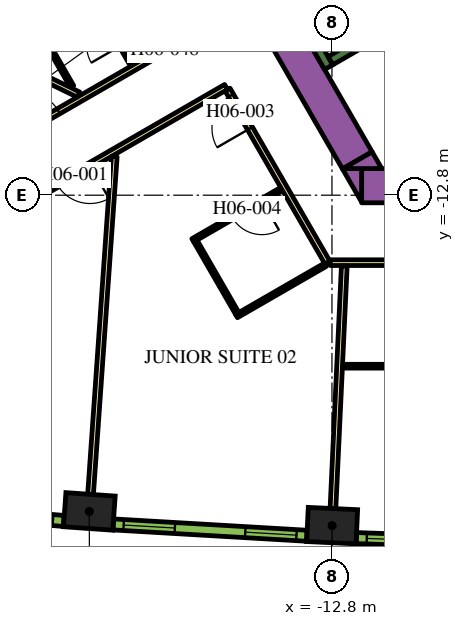
"""IFC4 building model, lengths in metres.
Left out: names, types, materials, properties, quantities, classifications, styles, units other than length and angle.
Written with IfcOpenShell. Run it as: python <this file> out.ifc"""

import sys

from ifc_helpers import new_model, si_unit, direction, frame, frame_2d, origin, origin_2d, place, context, subcontext, project, spatial, polyline, rectangle, outline, extrude, element, fill, save


model = new_model("IFC4")
c1 = context("Model", 3, precision=1e-05, world=origin(), true_north=direction((0.0, 1.0)))
c2 = subcontext(c1, "Body", "Model", "MODEL_VIEW")
j1 = project(units=[si_unit("LENGTHUNIT", "METRE"), si_unit("PLANEANGLEUNIT", "RADIAN")], contexts=[c1])
p1 = place(None, origin())
s1 = spatial("IfcSite", under=j1, at=p1, CompositionType="ELEMENT")
p2 = place(p1, origin())
s2 = spatial("IfcBuilding", under=s1, at=p2, CompositionType="ELEMENT")
p3 = place(p2, frame((0.0, 0.0, 83.7)))
s3 = spatial("IfcBuildingStorey", under=s2, at=p3, CompositionType="ELEMENT", Elevation=83.7)
for number, where, z_axis, x_axis in (
    (1, (-19.184, -21.12, 0.0), (0.0, 0.0, 1.0), (0.998, -0.07, 0.0)),
    (2, (-12.795, -21.494, 0.0), (0.0, 0.0, 1.0), (0.999, -0.047, 0.0)),
):
    element("IfcColumn", number, at=place(p3, frame(where, z_axis=z_axis, x_axis=x_axis)), inside=s3, PredefinedType="COLUMN", context=c2, shape_type="SweptSolid", body=[
        extrude(rectangle(XDim=1.3, YDim=0.9, at=origin_2d()), origin(), (0.0, 0.0, 1.0), 3.9),
    ])
p4 = place(p3, frame((-12.019, -12.55, 0.0), z_axis=(0.0, 0.0, 1.0), x_axis=(1.0, 0.0, 0.0)))
e3 = element("IfcWall", 3, at=p4, inside=s3, PredefinedType="SOLIDWALL", context=c2, shape_type="SweptSolid", body=[
    extrude(rectangle(XDim=21.63, YDim=0.9, at=frame_2d((10.815, 0.0))), origin(), (0.0, 0.0, 1.0), 3.9),
])
p5 = place(p3, origin())
e4 = element("IfcWall", 4, at=p5, inside=s3, PredefinedType="SOLIDWALL", context=c2, shape_type="SweptSolid", body=[
    extrude(outline(polyline([(-12.529, -12.1), (-12.021, -12.1), (-12.021, -12.98), (-12.529, -12.1)])), origin(), (0.0, 0.0, 1.0), 3.9),
])
p6 = place(p3, frame((-12.134, -11.883, 0.0), z_axis=(0.0, 0.0, 1.0), x_axis=(-0.500005339912, 0.866022320763, 0.0)))
e5 = element("IfcWall", 5, at=p6, inside=s3, PredefinedType="SOLIDWALL", context=c2, shape_type="SweptSolid", body=[
    extrude(rectangle(XDim=9.488, YDim=0.9, at=frame_2d((4.744, 0.0))), origin(), (0.0, 0.0, 1.0), 3.9),
])
e6 = element("IfcWall", 6, at=p5, inside=s3, PredefinedType="SOLIDWALL", context=c2, shape_type="SweptSolid", body=[
    extrude(outline(polyline([(-11.489, -12.1), (-12.505, -12.1), (-11.743, -11.66), (-11.489, -12.1)])), origin(), (0.0, 0.0, 1.0), 3.9),
])
p7 = place(p3, frame((-12.885, -9.431, 0.0), z_axis=(0.0, 0.0, 1.0), x_axis=(-0.500020560727, 0.866013532718, 0.0)))
e7 = element("IfcWall", 7, at=p7, inside=s3, PredefinedType="SOLIDWALL", context=c2, shape_type="SweptSolid", body=[
    extrude(rectangle(XDim=3.45, YDim=0.25, at=frame_2d((1.725, 0.0))), origin(), (0.0, 0.0, 1.0), 3.9),
])
p8 = place(p3, frame((-12.84, -9.261, 0.0), z_axis=(0.0, 0.0, 1.0), x_axis=(0.866016039709, 0.500016218704, 0.0)))
e8 = element("IfcWall", 8, at=p8, inside=s3, PredefinedType="SOLIDWALL", context=c2, shape_type="SweptSolid", body=[
    extrude(rectangle(XDim=7.05, YDim=0.25, at=frame_2d((3.525, 0.0))), origin(), (0.0, 0.0, 1.0), 3.9),
])
p9 = place(p3, frame((-28.211, -15.335, 0.0), z_axis=(0.0, 0.0, 1.0), x_axis=(0.866025884867, 0.49999916674, 0.0)))
e9 = element("IfcWall", 9, at=p9, inside=s3, PredefinedType="PARTITIONING", context=c2, shape_type="SweptSolid", body=[
    extrude(rectangle(XDim=13.543, YDim=0.15, at=frame_2d((6.772, 0.0))), origin(), (0.0, 0.0, 1.0), 2.75),
])
p10 = place(p9, frame((12.214, 0.0, 0.0)))
e10 = element("IfcOpeningElement", 10, at=p10, cuts=e9, PredefinedType="OPENING", context=c2, shape_type="SweptSolid", body=[
    extrude(rectangle(XDim=1.0, YDim=2.1, at=frame_2d((0.5, 1.05))), frame((0.0, 0.085, 0.0), z_axis=(0.0, -1.0, 0.0), x_axis=(1.0, 0.0, 0.0)), (0.0, 0.0, 1.0), 0.17),
])
p11 = place(p9, frame((8.488, 0.0, 0.0)))
e11 = element("IfcOpeningElement", 11, at=p11, cuts=e9, PredefinedType="OPENING", context=c2, shape_type="SweptSolid", body=[
    extrude(rectangle(XDim=1.0, YDim=2.1, at=frame_2d((0.5, 1.05))), frame((0.0, 0.085, 0.0), z_axis=(0.0, -1.0, 0.0), x_axis=(1.0, 0.0, 0.0)), (0.0, 0.0, 1.0), 0.17),
])
p12 = place(p3, frame((-15.587, -9.952, 0.0), z_axis=(0.0, 0.0, 1.0), x_axis=(-0.866017869832, -0.500013048961, 0.0)))
e12 = element("IfcWall", 12, at=p12, inside=s3, PredefinedType="PARTITIONING", context=c2, shape_type="SweptSolid", body=[
    extrude(rectangle(XDim=13.624, YDim=0.15, at=frame_2d((6.812, 0.0))), origin(), (0.0, 0.0, 1.0), 2.75),
])
p13 = place(p12, frame((4.134, 0.0, 0.0)))
e13 = element("IfcOpeningElement", 13, at=p13, cuts=e12, PredefinedType="OPENING", context=c2, shape_type="SweptSolid", body=[
    extrude(rectangle(XDim=1.0, YDim=2.1, at=frame_2d((0.5, 1.05))), frame((0.0, 0.085, 0.0), z_axis=(0.0, -1.0, 0.0), x_axis=(1.0, 0.0, 0.0)), (0.0, 0.0, 1.0), 0.17),
])
p14 = place(p3, frame((-12.918, -14.575, 0.0), z_axis=(0.0, 0.0, 1.0), x_axis=(-0.500009150678, 0.866020120573, 0.0)))
e14 = element("IfcWall", 14, at=p14, inside=s3, PredefinedType="PARTITIONING", context=c2, shape_type="SweptSolid", body=[
    extrude(rectangle(XDim=5.258, YDim=0.15, at=frame_2d((2.629, 0.0))), origin(), (0.0, 0.0, 1.0), 2.75),
])
p15 = place(p14, frame((4.078, 0.0, 0.0)))
e15 = element("IfcOpeningElement", 15, at=p15, cuts=e14, PredefinedType="OPENING", context=c2, shape_type="SweptSolid", body=[
    extrude(rectangle(XDim=1.0, YDim=2.1, at=frame_2d((0.5, 1.05))), frame((0.0, 0.085, 0.0), z_axis=(0.0, -1.0, 0.0), x_axis=(1.0, 0.0, 0.0)), (0.0, 0.0, 1.0), 0.17),
])
p16 = place(p3, frame((12.918, -14.575, 0.0), z_axis=(0.0, 0.0, 1.0), x_axis=(-1.0, 0.0, 0.0)))
e16 = element("IfcWall", 16, at=p16, inside=s3, PredefinedType="PARTITIONING", context=c2, shape_type="SweptSolid", body=[
    extrude(rectangle(XDim=25.766, YDim=0.15, at=frame_2d((12.883, 0.0))), origin(), (0.0, 0.0, 1.0), 2.75),
])
p17 = place(p16, frame((19.306, 0.0, 0.0)))
e17 = element("IfcOpeningElement", 17, at=p17, cuts=e16, PredefinedType="OPENING", context=c2, shape_type="SweptSolid", body=[
    extrude(rectangle(XDim=1.0, YDim=2.1, at=frame_2d((0.5, 1.05))), frame((0.0, 0.085, 0.0), z_axis=(0.0, -1.0, 0.0), x_axis=(1.0, 0.0, 0.0)), (0.0, 0.0, 1.0), 0.17),
])
p18 = place(p16, frame((17.999, 0.0, 0.0)))
e18 = element("IfcOpeningElement", 18, at=p18, cuts=e16, PredefinedType="OPENING", context=c2, shape_type="SweptSolid", body=[
    extrude(rectangle(XDim=1.0, YDim=2.1, at=frame_2d((0.5, 1.05))), frame((0.0, 0.085, 0.0), z_axis=(0.0, -1.0, 0.0), x_axis=(1.0, 0.0, 0.0)), (0.0, 0.0, 1.0), 0.17),
])
p19 = place(p16, frame((10.874, 0.0, 0.0)))
e19 = element("IfcOpeningElement", 19, at=p19, cuts=e16, PredefinedType="OPENING", context=c2, shape_type="SweptSolid", body=[
    extrude(rectangle(XDim=0.9, YDim=2.1, at=frame_2d((0.45, 1.05))), frame((0.0, 0.085, 0.0), z_axis=(0.0, -1.0, 0.0), x_axis=(1.0, 0.0, 0.0)), (0.0, 0.0, 1.0), 0.17),
])
p20 = place(p16, frame((8.647, 0.0, 0.0)))
e20 = element("IfcOpeningElement", 20, at=p20, cuts=e16, PredefinedType="OPENING", context=c2, shape_type="SweptSolid", body=[
    extrude(rectangle(XDim=1.0, YDim=2.1, at=frame_2d((0.5, 1.05))), frame((0.0, 0.085, 0.0), z_axis=(0.0, -1.0, 0.0), x_axis=(1.0, 0.0, 0.0)), (0.0, 0.0, 1.0), 0.17),
])
p21 = place(p16, frame((0.18, 0.0, 0.0)))
e21 = element("IfcOpeningElement", 21, at=p21, cuts=e16, PredefinedType="OPENING", context=c2, shape_type="SweptSolid", body=[
    extrude(rectangle(XDim=1.0, YDim=2.1, at=frame_2d((0.5, 1.05))), frame((0.0, 0.085, 0.0), z_axis=(0.0, -1.0, 0.0), x_axis=(1.0, 0.0, 0.0)), (0.0, 0.0, 1.0), 0.17),
])
p22 = place(p3, frame((-27.479, -6.251, 0.0), z_axis=(0.0, 0.0, 1.0), x_axis=(0.898945877276, -0.438059710231, 0.0)))
e22 = element("IfcWall", 22, at=p22, inside=s3, PredefinedType="PARTITIONING", context=c2, shape_type="SweptSolid", body=[
    extrude(rectangle(XDim=8.909, YDim=0.15, at=frame_2d((4.455, 0.0))), origin(), (0.0, 0.0, 1.0), 2.75),
])
p23 = place(p3, frame((-19.153, -20.671, 0.0), z_axis=(0.0, 0.0, 1.0), x_axis=(0.070070736723, 0.997542025107, 0.0)))
e23 = element("IfcWall", 23, at=p23, inside=s3, PredefinedType="PARTITIONING", context=c2, shape_type="SweptSolid", body=[
    extrude(rectangle(XDim=8.909, YDim=0.15, at=frame_2d((4.455, 0.0))), origin(), (0.0, 0.0, 1.0), 2.75),
])
p24 = place(p3, frame((-12.774, -21.045, 0.0), z_axis=(0.0, 0.0, 1.0), x_axis=(0.046750341626, 0.998906605023, 0.0)))
e24 = element("IfcWall", 24, at=p24, inside=s3, PredefinedType="PARTITIONING", context=c2, shape_type="SweptSolid", body=[
    extrude(rectangle(XDim=6.392, YDim=0.15, at=frame_2d((3.196, 0.0))), origin(), (0.0, 0.0, 1.0), 2.75),
])
p25 = place(p3, frame((-14.123, -12.638, 0.0), z_axis=(0.0, 0.0, 1.0), x_axis=(-0.86599734893, -0.500048589285, 0.0)))
e25 = element("IfcWall", 25, at=p25, inside=s3, PredefinedType="PARTITIONING", context=c2, shape_type="SweptSolid", body=[
    extrude(rectangle(XDim=2.7, YDim=0.1, at=frame_2d((1.35, 0.0))), origin(), (0.0, 0.0, 1.0), 2.75),
])
p26 = place(p25, frame((0.6, 0.0, 0.0)))
e26 = element("IfcOpeningElement", 26, at=p26, cuts=e25, PredefinedType="OPENING", context=c2, shape_type="SweptSolid", body=[
    extrude(rectangle(XDim=0.9, YDim=2.1, at=frame_2d((0.45, 1.05))), frame((0.0, 0.06, 0.0), z_axis=(0.0, -1.0, 0.0), x_axis=(1.0, 0.0, 0.0)), (0.0, 0.0, 1.0), 0.12),
])
p27 = place(p3, frame((-16.393, -14.006, 0.0), z_axis=(0.0, 0.0, 1.0), x_axis=(0.499946605688, -0.86605622881, 0.0)))
e27 = element("IfcWall", 27, at=p27, inside=s3, PredefinedType="PARTITIONING", context=c2, shape_type="SweptSolid", body=[
    extrude(rectangle(XDim=2.2, YDim=0.1, at=frame_2d((1.1, 0.0))), origin(), (0.0, 0.0, 1.0), 2.75),
])
p28 = place(p3, frame((-12.973, -14.63, 0.0), z_axis=(0.0, 0.0, 1.0), x_axis=(-0.866036505625, -0.499980770555, 0.0)))
e28 = element("IfcWall", 28, at=p28, inside=s3, PredefinedType="PARTITIONING", context=c2, shape_type="SweptSolid", body=[
    extrude(rectangle(XDim=2.7, YDim=0.1, at=frame_2d((1.35, 0.0))), origin(), (0.0, 0.0, 1.0), 2.75),
])
p29 = place(p3, frame((-10.272, -17.3, 0.0), z_axis=(0.0, 0.0, 1.0), x_axis=(-1.0, 0.0, 0.0)))
e29 = element("IfcWall", 29, at=p29, inside=s3, PredefinedType="PARTITIONING", context=c2, shape_type="SweptSolid", body=[
    extrude(rectangle(XDim=2.25, YDim=0.1, at=frame_2d((1.125, 0.0))), origin(), (0.0, 0.0, 1.0), 2.75),
])
p30 = place(p3, frame((-18.055, -9.385, 0.0), z_axis=(0.0, 0.0, 1.0), x_axis=(-0.499939757307, 0.866060182126, 0.0)))
e30 = element("IfcWall", 30, at=p30, inside=s3, PredefinedType="PARTITIONING", context=c2, shape_type="SweptSolid", body=[
    extrude(rectangle(XDim=2.95, YDim=0.1, at=frame_2d((1.475, 0.0))), origin(), (0.0, 0.0, 1.0), 2.75),
])
p31 = place(p30, frame((0.6, 0.0, 0.0)))
e31 = element("IfcOpeningElement", 31, at=p31, cuts=e30, PredefinedType="OPENING", context=c2, shape_type="SweptSolid", body=[
    extrude(rectangle(XDim=0.9, YDim=2.1, at=frame_2d((0.45, 1.05))), frame((0.0, 0.06, 0.0), z_axis=(0.0, -1.0, 0.0), x_axis=(1.0, 0.0, 0.0)), (0.0, 0.0, 1.0), 0.12),
])
p32 = place(p3, frame((-19.639, -9.941, 0.0), z_axis=(0.0, 0.0, 1.0), x_axis=(-0.499938597367, 0.866060851709, 0.0)))
e32 = element("IfcWall", 32, at=p32, inside=s3, PredefinedType="PARTITIONING", context=c2, shape_type="SweptSolid", body=[
    extrude(rectangle(XDim=2.64, YDim=0.1, at=frame_2d((1.32, 0.0))), origin(), (0.0, 0.0, 1.0), 2.75),
])
p33 = place(p3, frame((-24.946, -20.954, 0.0), z_axis=(0.0, 0.0, 1.0), x_axis=(0.99665273362, -0.081751627308, 0.0)))
e33 = element("IfcWall", 33, at=p33, inside=s3, PredefinedType="SOLIDWALL", context=c2, shape_type="SweptSolid", body=[
    extrude(rectangle(XDim=5.107, YDim=0.29, at=frame_2d((2.553, 0.0))), origin(), (0.0, 0.0, 1.0), 3.65),
])
p34 = place(p33, frame((0.24, 0.0, 0.9)))
e34 = element("IfcOpeningElement", 34, at=p34, cuts=e33, PredefinedType="OPENING", context=c2, shape_type="SweptSolid", body=[
    extrude(rectangle(XDim=1.35, YDim=2.15, at=frame_2d((0.675, 1.075))), frame((0.0, 0.155, 0.0), z_axis=(0.0, -1.0, 0.0), x_axis=(1.0, 0.0, 0.0)), (0.0, 0.0, 1.0), 0.31),
])
p35 = place(p33, frame((3.471, 0.0, 0.9)))
e35 = element("IfcOpeningElement", 35, at=p35, cuts=e33, PredefinedType="OPENING", context=c2, shape_type="SweptSolid", body=[
    extrude(rectangle(XDim=1.35, YDim=2.15, at=frame_2d((0.675, 1.075))), frame((0.0, 0.155, 0.0), z_axis=(0.0, -1.0, 0.0), x_axis=(1.0, 0.0, 0.0)), (0.0, 0.0, 1.0), 0.31),
])
p36 = place(p3, frame((-18.553, -21.463, 0.0), z_axis=(0.0, 0.0, 1.0), x_axis=(0.998290511436, -0.058447025388, 0.0)))
e36 = element("IfcWall", 36, at=p36, inside=s3, PredefinedType="SOLIDWALL", context=c2, shape_type="SweptSolid", body=[
    extrude(rectangle(XDim=5.1, YDim=0.29, at=frame_2d((2.55, 0.0))), origin(), (0.0, 0.0, 1.0), 3.65),
])
p37 = place(p36, frame((0.273, 0.0, 0.9)))
e37 = element("IfcOpeningElement", 37, at=p37, cuts=e36, PredefinedType="OPENING", context=c2, shape_type="SweptSolid", body=[
    extrude(rectangle(XDim=1.35, YDim=2.15, at=frame_2d((0.675, 1.075))), frame((0.0, 0.155, 0.0), z_axis=(0.0, -1.0, 0.0), x_axis=(1.0, 0.0, 0.0)), (0.0, 0.0, 1.0), 0.31),
])
p38 = place(p36, frame((3.478, 0.0, 0.9)))
e38 = element("IfcOpeningElement", 38, at=p38, cuts=e36, PredefinedType="OPENING", context=c2, shape_type="SweptSolid", body=[
    extrude(rectangle(XDim=1.35, YDim=2.15, at=frame_2d((0.675, 1.075))), frame((0.0, 0.155, 0.0), z_axis=(0.0, -1.0, 0.0), x_axis=(1.0, 0.0, 0.0)), (0.0, 0.0, 1.0), 0.31),
])
p39 = place(p3, frame((-12.157, -21.822, 0.0), z_axis=(0.0, 0.0, 1.0), x_axis=(0.999385993957, -0.035037623812, 0.0)))
e39 = element("IfcWall", 39, at=p39, inside=s3, PredefinedType="SOLIDWALL", context=c2, shape_type="SweptSolid", body=[
    extrude(rectangle(XDim=5.101, YDim=0.29, at=frame_2d((2.55, 0.0))), origin(), (0.0, 0.0, 1.0), 3.65),
])
p40 = place(p39, frame((0.273, 0.0, 0.9)))
e40 = element("IfcOpeningElement", 40, at=p40, cuts=e39, PredefinedType="OPENING", context=c2, shape_type="SweptSolid", body=[
    extrude(rectangle(XDim=1.35, YDim=2.15, at=frame_2d((0.675, 1.075))), frame((0.0, 0.155, 0.0), z_axis=(0.0, -1.0, 0.0), x_axis=(1.0, 0.0, 0.0)), (0.0, 0.0, 1.0), 0.31),
])
p41 = place(p39, frame((3.478, 0.0, 0.9)))
e41 = element("IfcOpeningElement", 41, at=p41, cuts=e39, PredefinedType="OPENING", context=c2, shape_type="SweptSolid", body=[
    extrude(rectangle(XDim=1.35, YDim=2.15, at=frame_2d((0.675, 1.075))), frame((0.0, 0.155, 0.0), z_axis=(0.0, -1.0, 0.0), x_axis=(1.0, 0.0, 0.0)), (0.0, 0.0, 1.0), 0.31),
])
p42 = place(p13, origin())
e42 = element("IfcDoor", 42, at=p42, inside=s3, OperationType="SINGLE_SWING_LEFT", PredefinedType="DOOR", context=c2, shape_type="SweptSolid", body=[
    extrude(rectangle(XDim=1.0, YDim=2.1, at=frame_2d((0.5, 1.05))), frame((0.0, 0.025, 0.0), z_axis=(0.0, -1.0, 0.0), x_axis=(1.0, 0.0, 0.0)), (0.0, 0.0, 1.0), 0.05),
])
fill(e13, e42)
p43 = place(p15, origin())
e43 = element("IfcDoor", 43, at=p43, inside=s3, OperationType="SINGLE_SWING_RIGHT", PredefinedType="DOOR", context=c2, shape_type="SweptSolid", body=[
    extrude(rectangle(XDim=1.0, YDim=2.1, at=frame_2d((0.5, 1.05))), frame((0.0, 0.025, 0.0), z_axis=(0.0, -1.0, 0.0), x_axis=(1.0, 0.0, 0.0)), (0.0, 0.0, 1.0), 0.05),
])
fill(e15, e43)
p44 = place(p26, origin())
e44 = element("IfcDoor", 44, at=p44, inside=s3, OperationType="SINGLE_SWING_LEFT", PredefinedType="DOOR", context=c2, shape_type="SweptSolid", body=[
    extrude(rectangle(XDim=0.9, YDim=2.1, at=frame_2d((0.45, 1.05))), frame((0.0, 0.025, 0.0), z_axis=(0.0, -1.0, 0.0), x_axis=(1.0, 0.0, 0.0)), (0.0, 0.0, 1.0), 0.05),
])
fill(e26, e44)
p45 = place(p10, origin())
e45 = element("IfcDoor", 45, at=p45, inside=s3, OperationType="SINGLE_SWING_RIGHT", PredefinedType="DOOR", context=c2, shape_type="SweptSolid", body=[
    extrude(rectangle(XDim=1.0, YDim=2.1, at=frame_2d((0.5, 1.05))), frame((0.0, 0.025, 0.0), z_axis=(0.0, -1.0, 0.0), x_axis=(1.0, 0.0, 0.0)), (0.0, 0.0, 1.0), 0.05),
])
fill(e10, e45)
p46 = place(p11, origin())
e46 = element("IfcDoor", 46, at=p46, inside=s3, OperationType="SINGLE_SWING_RIGHT", PredefinedType="DOOR", context=c2, shape_type="SweptSolid", body=[
    extrude(rectangle(XDim=1.0, YDim=2.1, at=frame_2d((0.5, 1.05))), frame((0.0, 0.025, 0.0), z_axis=(0.0, -1.0, 0.0), x_axis=(1.0, 0.0, 0.0)), (0.0, 0.0, 1.0), 0.05),
])
fill(e11, e46)
p47 = place(p35, origin())
e47 = element("IfcWindow", 47, at=p47, inside=s3, PartitioningType="DOUBLE_PANEL_VERTICAL", PredefinedType="WINDOW", context=c2, shape_type="SweptSolid", body=[
    extrude(rectangle(XDim=1.35, YDim=2.15, at=frame_2d((0.675, 1.075))), frame((0.0, 0.015, 0.0), z_axis=(0.0, -1.0, 0.0), x_axis=(1.0, 0.0, 0.0)), (0.0, 0.0, 1.0), 0.06),
])
fill(e35, e47)
p48 = place(p37, origin())
e48 = element("IfcWindow", 48, at=p48, inside=s3, PartitioningType="DOUBLE_PANEL_VERTICAL", PredefinedType="WINDOW", context=c2, shape_type="SweptSolid", body=[
    extrude(rectangle(XDim=1.35, YDim=2.15, at=frame_2d((0.675, 1.075))), frame((0.0, 0.015, 0.0), z_axis=(0.0, -1.0, 0.0), x_axis=(1.0, 0.0, 0.0)), (0.0, 0.0, 1.0), 0.06),
])
fill(e37, e48)
p49 = place(p38, origin())
e49 = element("IfcWindow", 49, at=p49, inside=s3, PartitioningType="DOUBLE_PANEL_VERTICAL", PredefinedType="WINDOW", context=c2, shape_type="SweptSolid", body=[
    extrude(rectangle(XDim=1.35, YDim=2.15, at=frame_2d((0.675, 1.075))), frame((0.0, 0.015, 0.0), z_axis=(0.0, -1.0, 0.0), x_axis=(1.0, 0.0, 0.0)), (0.0, 0.0, 1.0), 0.06),
])
fill(e38, e49)
p50 = place(p40, origin())
e50 = element("IfcWindow", 50, at=p50, inside=s3, PartitioningType="DOUBLE_PANEL_VERTICAL", PredefinedType="WINDOW", context=c2, shape_type="SweptSolid", body=[
    extrude(rectangle(XDim=1.35, YDim=2.15, at=frame_2d((0.675, 1.075))), frame((0.0, 0.015, 0.0), z_axis=(0.0, -1.0, 0.0), x_axis=(1.0, 0.0, 0.0)), (0.0, 0.0, 1.0), 0.06),
])
fill(e40, e50)
save(model, sys.argv[1])
